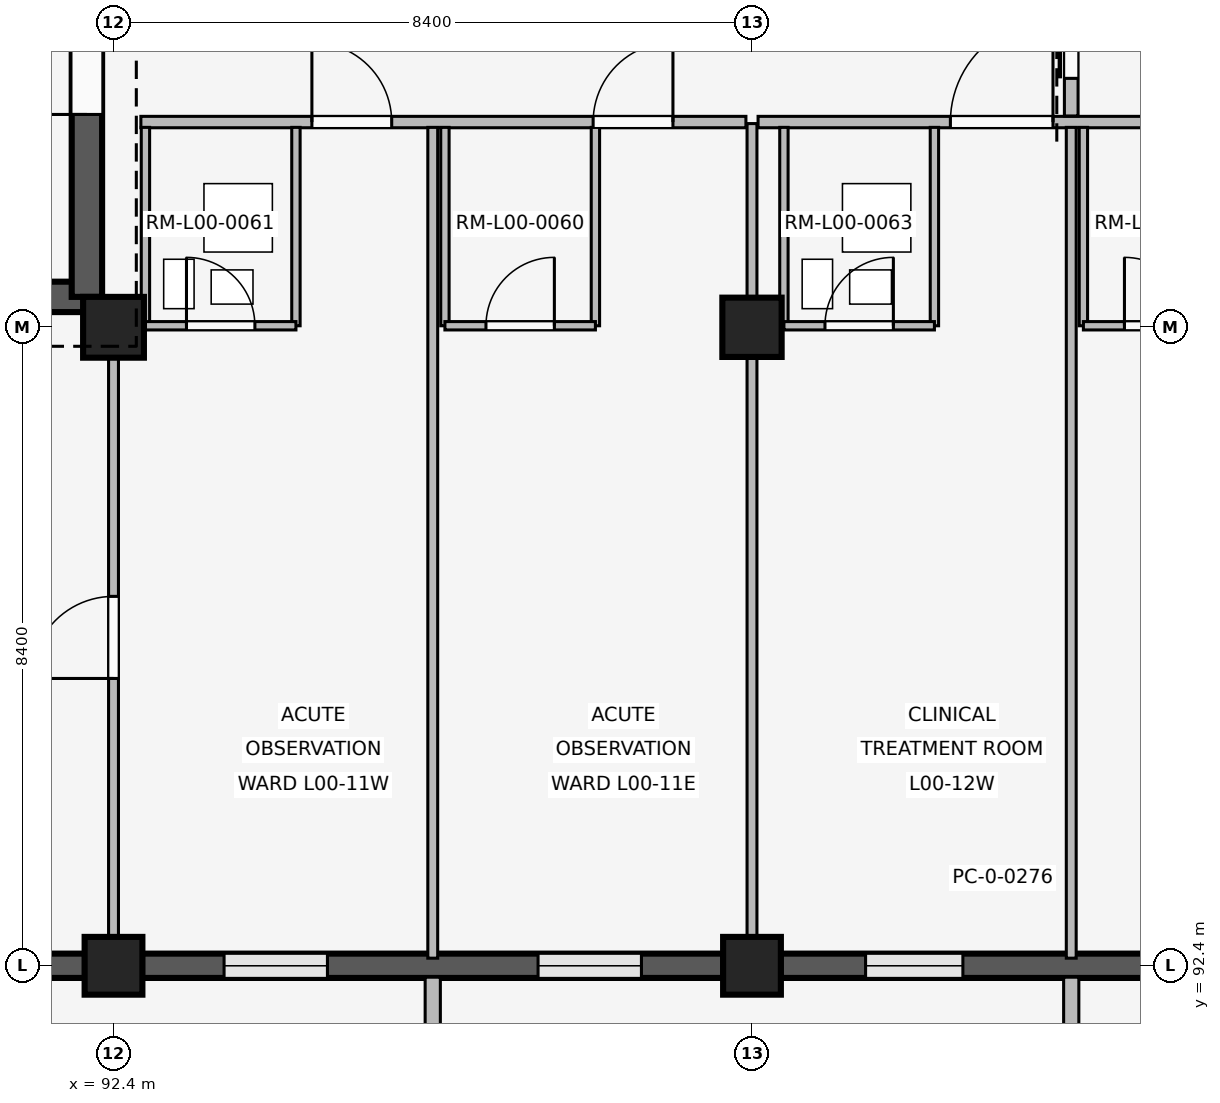
"""IFC4 building model, lengths in metres.
Left out: names, types, materials, properties, quantities, classifications, styles, units other than length and angle.
Written with IfcOpenShell. Run it as: python <this file> out.ifc"""

import sys

from ifc_helpers import new_model, si_unit, direction, frame, frame_2d, origin, origin_2d, place, context, subcontext, project, spatial, rectangle, extrude, element, fill, save


model = new_model("IFC4")
c1 = context("Model", 3, precision=1e-05, world=origin(), true_north=direction((0.0, 1.0)))
c2 = subcontext(c1, "Body", "Model", "MODEL_VIEW")
j1 = project(units=[si_unit("LENGTHUNIT", "METRE"), si_unit("PLANEANGLEUNIT", "RADIAN")], contexts=[c1])
p1 = place(None, origin())
s1 = spatial("IfcSite", under=j1, at=p1, CompositionType="ELEMENT")
p2 = place(p1, origin())
s2 = spatial("IfcBuilding", under=s1, at=p2, CompositionType="ELEMENT")
p3 = place(p2, origin())
s3 = spatial("IfcBuildingStorey", under=s2, at=p3, CompositionType="ELEMENT", Elevation=0.0)
p4 = place(p3, frame((92.4, 92.4, 0.0), z_axis=(0.0, 0.0, 1.0), x_axis=(1.0, 0.0, 0.0)))
e1 = element("IfcColumn", 1, at=p4, inside=s3, PredefinedType="COLUMN", context=c2, shape_type="SweptSolid", body=[
    extrude(rectangle(XDim=0.76, YDim=0.76, at=origin_2d()), origin(), (0.0, 0.0, 1.0), 4.8),
])
p5 = place(p3, frame((92.4, 100.8, 0.0), z_axis=(0.0, 0.0, 1.0), x_axis=(1.0, 0.0, 0.0)))
e2 = element("IfcColumn", 2, at=p5, inside=s3, PredefinedType="COLUMN", context=c2, shape_type="SweptSolid", body=[
    extrude(rectangle(XDim=0.8, YDim=0.8, at=origin_2d()), origin(), (0.0, 0.0, 1.0), 4.8),
])
p6 = place(p3, frame((100.8, 92.4, 0.0), z_axis=(0.0, 0.0, 1.0), x_axis=(1.0, 0.0, 0.0)))
e3 = element("IfcColumn", 3, at=p6, inside=s3, PredefinedType="COLUMN", context=c2, shape_type="SweptSolid", body=[
    extrude(rectangle(XDim=0.76, YDim=0.76, at=origin_2d()), origin(), (0.0, 0.0, 1.0), 4.8),
])
p7 = place(p3, frame((100.8, 100.8, 0.0), z_axis=(0.0, 0.0, 1.0), x_axis=(1.0, 0.0, 0.0)))
e4 = element("IfcColumn", 4, at=p7, inside=s3, PredefinedType="COLUMN", context=c2, shape_type="SweptSolid", body=[
    extrude(rectangle(XDim=0.78, YDim=0.78, at=origin_2d()), origin(), (0.0, 0.0, 1.0), 4.8),
])
p8 = place(p3, frame((92.025, 92.4, 0.0), z_axis=(0.0, 0.0, 1.0), x_axis=(-1.0, 0.0, 0.0)))
e5 = element("IfcWall", 5, at=p8, inside=s3, PredefinedType="SOLIDWALL", context=c2, shape_type="SweptSolid", body=[
    extrude(rectangle(XDim=7.65, YDim=0.32, at=frame_2d((3.825, 0.0))), origin(), (0.0, 0.0, 1.0), 3.82),
])
p9 = place(p8, frame((1.01, 0.0, 0.85)))
e6 = element("IfcOpeningElement", 6, at=p9, cuts=e5, PredefinedType="OPENING", context=c2, shape_type="SweptSolid", body=[
    extrude(rectangle(XDim=1.5, YDim=1.55, at=frame_2d((0.75, 0.775))), frame((0.0, 0.17, 0.0), z_axis=(0.0, -1.0, 0.0), x_axis=(1.0, 0.0, 0.0)), (0.0, 0.0, 1.0), 0.34),
])
p10 = place(p8, frame((5.14, 0.0, 0.85)))
e7 = element("IfcOpeningElement", 7, at=p10, cuts=e5, PredefinedType="OPENING", context=c2, shape_type="SweptSolid", body=[
    extrude(rectangle(XDim=1.5, YDim=1.55, at=frame_2d((0.75, 0.775))), frame((0.0, 0.17, 0.0), z_axis=(0.0, -1.0, 0.0), x_axis=(1.0, 0.0, 0.0)), (0.0, 0.0, 1.0), 0.34),
])
p11 = place(p3, frame((100.425, 92.4, 0.0), z_axis=(0.0, 0.0, 1.0), x_axis=(-1.0, 0.0, 0.0)))
e8 = element("IfcWall", 8, at=p11, inside=s3, PredefinedType="SOLIDWALL", context=c2, shape_type="SweptSolid", body=[
    extrude(rectangle(XDim=7.65, YDim=0.32, at=frame_2d((3.825, 0.0))), origin(), (0.0, 0.0, 1.0), 3.82),
])
p12 = place(p11, frame((1.08, 0.0, 0.85)))
e9 = element("IfcOpeningElement", 9, at=p12, cuts=e8, PredefinedType="OPENING", context=c2, shape_type="SweptSolid", body=[
    extrude(rectangle(XDim=1.36, YDim=1.42, at=frame_2d((0.68, 0.71))), frame((0.0, 0.17, 0.0), z_axis=(0.0, -1.0, 0.0), x_axis=(1.0, 0.0, 0.0)), (0.0, 0.0, 1.0), 0.34),
])
p13 = place(p11, frame((5.21, 0.0, 0.85)))
e10 = element("IfcOpeningElement", 10, at=p13, cuts=e8, PredefinedType="OPENING", context=c2, shape_type="SweptSolid", body=[
    extrude(rectangle(XDim=1.36, YDim=1.42, at=frame_2d((0.68, 0.71))), frame((0.0, 0.17, 0.0), z_axis=(0.0, -1.0, 0.0), x_axis=(1.0, 0.0, 0.0)), (0.0, 0.0, 1.0), 0.34),
])
p14 = place(p3, frame((96.6, 92.25, 0.0), z_axis=(0.0, 0.0, 1.0), x_axis=(0.0, -1.0, 0.0)))
e11 = element("IfcWall", 11, at=p14, inside=s3, PredefinedType="ELEMENTEDWALL", context=c2, shape_type="SweptSolid", body=[
    extrude(rectangle(XDim=0.85, YDim=0.2, at=frame_2d((0.425, 0.0))), origin(), (0.0, 0.0, 1.0), 3.8),
])
p15 = place(p3, frame((108.825, 92.4, 0.0), z_axis=(0.0, 0.0, 1.0), x_axis=(-1.0, 0.0, 0.0)))
e12 = element("IfcWall", 12, at=p15, inside=s3, PredefinedType="SOLIDWALL", context=c2, shape_type="SweptSolid", body=[
    extrude(rectangle(XDim=7.65, YDim=0.32, at=frame_2d((3.825, 0.0))), origin(), (0.0, 0.0, 1.0), 3.82),
])
p16 = place(p15, frame((1.119, 0.0, 0.85)))
e13 = element("IfcOpeningElement", 13, at=p16, cuts=e12, PredefinedType="OPENING", context=c2, shape_type="SweptSolid", body=[
    extrude(rectangle(XDim=1.28, YDim=1.38, at=frame_2d((0.64, 0.69))), frame((0.0, 0.17, 0.0), z_axis=(0.0, -1.0, 0.0), x_axis=(1.0, 0.0, 0.0)), (0.0, 0.0, 1.0), 0.34),
])
p17 = place(p15, frame((5.25, 0.0, 0.85)))
e14 = element("IfcOpeningElement", 14, at=p17, cuts=e12, PredefinedType="OPENING", context=c2, shape_type="SweptSolid", body=[
    extrude(rectangle(XDim=1.28, YDim=1.38, at=frame_2d((0.64, 0.69))), frame((0.0, 0.17, 0.0), z_axis=(0.0, -1.0, 0.0), x_axis=(1.0, 0.0, 0.0)), (0.0, 0.0, 1.0), 0.34),
])
p18 = place(p3, frame((105.0, 92.25, 0.0), z_axis=(0.0, 0.0, 1.0), x_axis=(0.0, -1.0, 0.0)))
e15 = element("IfcWall", 15, at=p18, inside=s3, PredefinedType="ELEMENTEDWALL", context=c2, shape_type="SweptSolid", body=[
    extrude(rectangle(XDim=0.85, YDim=0.2, at=frame_2d((0.425, 0.0))), origin(), (0.0, 0.0, 1.0), 3.8),
])
p19 = place(p3, frame((84.55, 101.2, 0.0), z_axis=(0.0, 0.0, 1.0), x_axis=(1.0, 0.0, 0.0)))
e16 = element("IfcWall", 16, at=p19, inside=s3, PredefinedType="SHEAR", context=c2, shape_type="SweptSolid", body=[
    extrude(rectangle(XDim=7.5, YDim=0.4, at=frame_2d((3.75, 0.0))), origin(), (0.0, 0.0, 1.0), 4.52),
])
p20 = place(p19, frame((4.85, 0.0, 0.0)))
e17 = element("IfcOpeningElement", 17, at=p20, cuts=e16, PredefinedType="OPENING", context=c2, shape_type="SweptSolid", body=[
    extrude(rectangle(XDim=1.2, YDim=2.2, at=frame_2d((0.6, 1.1))), frame((0.0, 0.21, 0.0), z_axis=(0.0, -1.0, 0.0), x_axis=(1.0, 0.0, 0.0)), (0.0, 0.0, 1.0), 0.42),
])
p21 = place(p3, frame((92.05, 101.2, 0.0), z_axis=(0.0, 0.0, 1.0), x_axis=(0.0, 1.0, 0.0)))
e18 = element("IfcWall", 18, at=p21, inside=s3, PredefinedType="SHEAR", context=c2, shape_type="SweptSolid", body=[
    extrude(rectangle(XDim=7.55, YDim=0.4, at=frame_2d((3.775, 0.0))), origin(), (0.0, 0.0, 1.0), 4.52),
])
p22 = place(p21, frame((2.4, 0.0, 0.0)))
e19 = element("IfcOpeningElement", 19, at=p22, cuts=e18, PredefinedType="OPENING", context=c2, shape_type="SweptSolid", body=[
    extrude(rectangle(XDim=1.2, YDim=2.2, at=frame_2d((0.6, 1.1))), frame((0.0, 0.21, 0.0), z_axis=(0.0, -1.0, 0.0), x_axis=(1.0, 0.0, 0.0)), (0.0, 0.0, 1.0), 0.42),
])
p23 = place(p3, frame((92.4, 92.54, 0.0), z_axis=(0.0, 0.0, 1.0), x_axis=(0.0, 1.0, 0.0)))
e20 = element("IfcWall", 20, at=p23, inside=s3, PredefinedType="PARTITIONING", context=c2, shape_type="SweptSolid", body=[
    extrude(rectangle(XDim=8.21, YDim=0.13, at=frame_2d((4.105, 0.0))), origin(), (0.0, 0.0, 1.0), 3.8),
])
p24 = place(p23, frame((3.64, 0.0, 0.0)))
e21 = element("IfcOpeningElement", 21, at=p24, cuts=e20, PredefinedType="OPENING", context=c2, shape_type="SweptSolid", body=[
    extrude(rectangle(XDim=1.08, YDim=2.15, at=frame_2d((0.54, 1.075))), frame((0.0, 0.075, 0.0), z_axis=(0.0, -1.0, 0.0), x_axis=(1.0, 0.0, 0.0)), (0.0, 0.0, 1.0), 0.15),
])
p25 = place(p3, frame((92.76, 103.5, 0.0), z_axis=(0.0, 0.0, 1.0), x_axis=(1.0, 0.0, 0.0)))
e22 = element("IfcWall", 22, at=p25, inside=s3, PredefinedType="PARTITIONING", context=c2, shape_type="SweptSolid", body=[
    extrude(rectangle(XDim=7.96, YDim=0.15, at=frame_2d((3.98, 0.0))), origin(), (0.0, 0.0, 1.0), 3.8),
])
p26 = place(p25, frame((2.25, 0.0, 0.0)))
e23 = element("IfcOpeningElement", 23, at=p26, cuts=e22, PredefinedType="OPENING", context=c2, shape_type="SweptSolid", body=[
    extrude(rectangle(XDim=1.05, YDim=2.2, at=frame_2d((0.525, 1.1))), frame((0.0, 0.085, 0.0), z_axis=(0.0, -1.0, 0.0), x_axis=(1.0, 0.0, 0.0)), (0.0, 0.0, 1.0), 0.17),
])
p27 = place(p25, frame((5.95, 0.0, 0.0)))
e24 = element("IfcOpeningElement", 24, at=p27, cuts=e22, PredefinedType="OPENING", context=c2, shape_type="SweptSolid", body=[
    extrude(rectangle(XDim=1.05, YDim=2.2, at=frame_2d((0.525, 1.1))), frame((0.0, 0.085, 0.0), z_axis=(0.0, -1.0, 0.0), x_axis=(1.0, 0.0, 0.0)), (0.0, 0.0, 1.0), 0.17),
])
p28 = place(p3, frame((96.6, 92.5, 0.0), z_axis=(0.0, 0.0, 1.0), x_axis=(0.0, 1.0, 0.0)))
e25 = element("IfcWall", 25, at=p28, inside=s3, PredefinedType="PARTITIONING", context=c2, shape_type="SweptSolid", body=[
    extrude(rectangle(XDim=10.93, YDim=0.13, at=frame_2d((5.465, 0.0))), origin(), (0.0, 0.0, 1.0), 3.8),
])
for number, where, z_axis, x_axis in (
    (26, (92.82, 100.82, 0.0), (0.0, 0.0, 1.0), (0.0, 1.0, 0.0)),
    (27, (94.8, 100.82, 0.0), (0.0, 0.0, 1.0), (0.0, 1.0, 0.0)),
):
    element("IfcWall", number, at=place(p3, frame(where, z_axis=z_axis, x_axis=x_axis)), inside=s3, PredefinedType="PARTITIONING", context=c2, shape_type="SweptSolid", body=[
        extrude(rectangle(XDim=2.61, YDim=0.11, at=frame_2d((1.305, 0.0))), origin(), (0.0, 0.0, 1.0), 3.8),
    ])
p29 = place(p3, frame((92.82, 100.82, 0.0), z_axis=(0.0, 0.0, 1.0), x_axis=(1.0, 0.0, 0.0)))
e28 = element("IfcWall", 28, at=p29, inside=s3, PredefinedType="PARTITIONING", context=c2, shape_type="SweptSolid", body=[
    extrude(rectangle(XDim=1.98, YDim=0.11, at=frame_2d((0.99, 0.0))), origin(), (0.0, 0.0, 1.0), 3.8),
])
p30 = place(p29, frame((0.54, 0.0, 0.0)))
e29 = element("IfcOpeningElement", 29, at=p30, cuts=e28, PredefinedType="OPENING", context=c2, shape_type="SweptSolid", body=[
    extrude(rectangle(XDim=0.9, YDim=2.1, at=frame_2d((0.45, 1.05))), frame((0.0, 0.065, 0.0), z_axis=(0.0, -1.0, 0.0), x_axis=(1.0, 0.0, 0.0)), (0.0, 0.0, 1.0), 0.13),
])
for number, where, z_axis, x_axis in (
    (30, (96.76, 100.82, 0.0), (0.0, 0.0, 1.0), (0.0, 1.0, 0.0)),
    (31, (98.74, 100.82, 0.0), (0.0, 0.0, 1.0), (0.0, 1.0, 0.0)),
):
    element("IfcWall", number, at=place(p3, frame(where, z_axis=z_axis, x_axis=x_axis)), inside=s3, PredefinedType="PARTITIONING", context=c2, shape_type="SweptSolid", body=[
        extrude(rectangle(XDim=2.61, YDim=0.11, at=frame_2d((1.305, 0.0))), origin(), (0.0, 0.0, 1.0), 3.8),
    ])
p31 = place(p3, frame((96.76, 100.82, 0.0), z_axis=(0.0, 0.0, 1.0), x_axis=(1.0, 0.0, 0.0)))
e32 = element("IfcWall", 32, at=p31, inside=s3, PredefinedType="PARTITIONING", context=c2, shape_type="SweptSolid", body=[
    extrude(rectangle(XDim=1.98, YDim=0.11, at=frame_2d((0.99, 0.0))), origin(), (0.0, 0.0, 1.0), 3.8),
])
p32 = place(p31, frame((0.54, 0.0, 0.0)))
e33 = element("IfcOpeningElement", 33, at=p32, cuts=e32, PredefinedType="OPENING", context=c2, shape_type="SweptSolid", body=[
    extrude(rectangle(XDim=0.9, YDim=2.1, at=frame_2d((0.45, 1.05))), frame((0.0, 0.065, 0.0), z_axis=(0.0, -1.0, 0.0), x_axis=(1.0, 0.0, 0.0)), (0.0, 0.0, 1.0), 0.13),
])
p33 = place(p3, frame((100.8, 92.54, 0.0), z_axis=(0.0, 0.0, 1.0), x_axis=(0.0, 1.0, 0.0)))
e34 = element("IfcWall", 34, at=p33, inside=s3, PredefinedType="PARTITIONING", context=c2, shape_type="SweptSolid", body=[
    extrude(rectangle(XDim=10.94, YDim=0.13, at=frame_2d((5.47, 0.0))), origin(), (0.0, 0.0, 1.0), 3.8),
])
p34 = place(p3, frame((100.88, 103.5, 0.0), z_axis=(0.0, 0.0, 1.0), x_axis=(1.0, 0.0, 0.0)))
e35 = element("IfcWall", 35, at=p34, inside=s3, PredefinedType="PARTITIONING", context=c2, shape_type="SweptSolid", body=[
    extrude(rectangle(XDim=8.24, YDim=0.15, at=frame_2d((4.12, 0.0))), origin(), (0.0, 0.0, 1.0), 3.8),
])
p35 = place(p34, frame((2.53, 0.0, 0.0)))
e36 = element("IfcOpeningElement", 36, at=p35, cuts=e35, PredefinedType="OPENING", context=c2, shape_type="SweptSolid", body=[
    extrude(rectangle(XDim=1.35, YDim=2.25, at=frame_2d((0.675, 1.125))), frame((0.0, 0.085, 0.0), z_axis=(0.0, -1.0, 0.0), x_axis=(1.0, 0.0, 0.0)), (0.0, 0.0, 1.0), 0.17),
])
p36 = place(p34, frame((6.23, 0.0, 0.0)))
e37 = element("IfcOpeningElement", 37, at=p36, cuts=e35, PredefinedType="OPENING", context=c2, shape_type="SweptSolid", body=[
    extrude(rectangle(XDim=1.35, YDim=2.25, at=frame_2d((0.675, 1.125))), frame((0.0, 0.085, 0.0), z_axis=(0.0, -1.0, 0.0), x_axis=(1.0, 0.0, 0.0)), (0.0, 0.0, 1.0), 0.17),
])
p37 = place(p3, frame((105.0, 92.5, 0.0), z_axis=(0.0, 0.0, 1.0), x_axis=(0.0, 1.0, 0.0)))
e38 = element("IfcWall", 38, at=p37, inside=s3, PredefinedType="PARTITIONING", context=c2, shape_type="SweptSolid", body=[
    extrude(rectangle(XDim=10.93, YDim=0.13, at=frame_2d((5.465, 0.0))), origin(), (0.0, 0.0, 1.0), 3.8),
])
for number, where, z_axis, x_axis in (
    (39, (101.22, 100.82, 0.0), (0.0, 0.0, 1.0), (0.0, 1.0, 0.0)),
    (40, (103.2, 100.82, 0.0), (0.0, 0.0, 1.0), (0.0, 1.0, 0.0)),
):
    element("IfcWall", number, at=place(p3, frame(where, z_axis=z_axis, x_axis=x_axis)), inside=s3, PredefinedType="PARTITIONING", context=c2, shape_type="SweptSolid", body=[
        extrude(rectangle(XDim=2.61, YDim=0.11, at=frame_2d((1.305, 0.0))), origin(), (0.0, 0.0, 1.0), 3.8),
    ])
p38 = place(p3, frame((101.22, 100.82, 0.0), z_axis=(0.0, 0.0, 1.0), x_axis=(1.0, 0.0, 0.0)))
e41 = element("IfcWall", 41, at=p38, inside=s3, PredefinedType="PARTITIONING", context=c2, shape_type="SweptSolid", body=[
    extrude(rectangle(XDim=1.98, YDim=0.11, at=frame_2d((0.99, 0.0))), origin(), (0.0, 0.0, 1.0), 3.8),
])
p39 = place(p38, frame((0.54, 0.0, 0.0)))
e42 = element("IfcOpeningElement", 42, at=p39, cuts=e41, PredefinedType="OPENING", context=c2, shape_type="SweptSolid", body=[
    extrude(rectangle(XDim=0.9, YDim=2.1, at=frame_2d((0.45, 1.05))), frame((0.0, 0.065, 0.0), z_axis=(0.0, -1.0, 0.0), x_axis=(1.0, 0.0, 0.0)), (0.0, 0.0, 1.0), 0.13),
])
p40 = place(p3, frame((105.16, 100.82, 0.0), z_axis=(0.0, 0.0, 1.0), x_axis=(0.0, 1.0, 0.0)))
e43 = element("IfcWall", 43, at=p40, inside=s3, PredefinedType="PARTITIONING", context=c2, shape_type="SweptSolid", body=[
    extrude(rectangle(XDim=2.61, YDim=0.11, at=frame_2d((1.305, 0.0))), origin(), (0.0, 0.0, 1.0), 3.8),
])
p41 = place(p3, frame((105.16, 100.82, 0.0), z_axis=(0.0, 0.0, 1.0), x_axis=(1.0, 0.0, 0.0)))
e44 = element("IfcWall", 44, at=p41, inside=s3, PredefinedType="PARTITIONING", context=c2, shape_type="SweptSolid", body=[
    extrude(rectangle(XDim=1.98, YDim=0.11, at=frame_2d((0.99, 0.0))), origin(), (0.0, 0.0, 1.0), 3.8),
])
p42 = place(p41, frame((0.54, 0.0, 0.0)))
e45 = element("IfcOpeningElement", 45, at=p42, cuts=e44, PredefinedType="OPENING", context=c2, shape_type="SweptSolid", body=[
    extrude(rectangle(XDim=0.9, YDim=2.1, at=frame_2d((0.45, 1.05))), frame((0.0, 0.065, 0.0), z_axis=(0.0, -1.0, 0.0), x_axis=(1.0, 0.0, 0.0)), (0.0, 0.0, 1.0), 0.13),
])
p43 = place(p3, frame((103.65, 93.55, 0.0), z_axis=(0.0, 0.0, 1.0), x_axis=(1.0, 0.0, 0.0)))
e46 = element("IfcWall", 46, at=p43, inside=s3, PredefinedType="PLUMBINGWALL", context=c2, shape_type="SweptSolid", body=[
    extrude(rectangle(XDim=0.9, YDim=0.24, at=frame_2d((0.45, 0.0))), origin(), (0.0, 0.0, 1.0), 3.8),
])
p44 = place(p3, frame((105.0, 103.58, 0.0), z_axis=(0.0, 0.0, 1.0), x_axis=(0.0, 1.0, 0.0)))
e47 = element("IfcWall", 47, at=p44, inside=s3, PredefinedType="PARTITIONING", context=c2, shape_type="SweptSolid", body=[
    extrude(rectangle(XDim=2.84, YDim=0.18, at=frame_2d((1.42, 0.0))), origin(), (0.0, 0.0, 1.0), 3.8),
])
p45 = place(p44, frame((0.495, 0.0, 0.0)))
e48 = element("IfcOpeningElement", 48, at=p45, cuts=e47, PredefinedType="OPENING", context=c2, shape_type="SweptSolid", body=[
    extrude(rectangle(XDim=1.85, YDim=2.3, at=frame_2d((0.925, 1.15))), frame((0.0, 0.1, 0.0), z_axis=(0.0, -1.0, 0.0), x_axis=(1.0, 0.0, 0.0)), (0.0, 0.0, 1.0), 0.2),
])
p46 = place(p12, origin())
e49 = element("IfcWindow", 49, at=p46, inside=s3, PartitioningType="SINGLE_PANEL", PredefinedType="WINDOW", context=c2, shape_type="SweptSolid", body=[
    extrude(rectangle(XDim=1.36, YDim=1.42, at=frame_2d((0.68, 0.71))), frame((0.0, 0.03, 0.0), z_axis=(0.0, -1.0, 0.0), x_axis=(1.0, 0.0, 0.0)), (0.0, 0.0, 1.0), 0.06),
])
fill(e9, e49)
p47 = place(p13, origin())
e50 = element("IfcWindow", 50, at=p47, inside=s3, PartitioningType="SINGLE_PANEL", PredefinedType="WINDOW", context=c2, shape_type="SweptSolid", body=[
    extrude(rectangle(XDim=1.36, YDim=1.42, at=frame_2d((0.68, 0.71))), frame((0.0, 0.03, 0.0), z_axis=(0.0, -1.0, 0.0), x_axis=(1.0, 0.0, 0.0)), (0.0, 0.0, 1.0), 0.06),
])
fill(e10, e50)
p48 = place(p17, origin())
e51 = element("IfcWindow", 51, at=p48, inside=s3, PartitioningType="SINGLE_PANEL", PredefinedType="WINDOW", context=c2, shape_type="SweptSolid", body=[
    extrude(rectangle(XDim=1.28, YDim=1.38, at=frame_2d((0.64, 0.69))), frame((0.0, 0.03, 0.0), z_axis=(0.0, -1.0, 0.0), x_axis=(1.0, 0.0, 0.0)), (0.0, 0.0, 1.0), 0.06),
])
fill(e14, e51)
p49 = place(p22, origin())
e52 = element("IfcDoor", 52, at=p49, inside=s3, OperationType="SINGLE_SWING_LEFT", PredefinedType="DOOR", context=c2, shape_type="SweptSolid", body=[
    extrude(rectangle(XDim=1.2, YDim=2.2, at=frame_2d((0.6, 1.1))), frame((0.0, 0.025, 0.0), z_axis=(0.0, -1.0, 0.0), x_axis=(1.0, 0.0, 0.0)), (0.0, 0.0, 1.0), 0.05),
])
fill(e19, e52)
p50 = place(p24, origin())
e53 = element("IfcDoor", 53, at=p50, inside=s3, OperationType="SINGLE_SWING_LEFT", PredefinedType="DOOR", context=c2, shape_type="SweptSolid", body=[
    extrude(rectangle(XDim=1.08, YDim=2.15, at=frame_2d((0.54, 1.075))), frame((0.0, 0.025, 0.0), z_axis=(0.0, -1.0, 0.0), x_axis=(1.0, 0.0, 0.0)), (0.0, 0.0, 1.0), 0.05),
])
fill(e21, e53)
p51 = place(p26, origin())
e54 = element("IfcDoor", 54, at=p51, inside=s3, OperationType="SINGLE_SWING_LEFT", PredefinedType="DOOR", context=c2, shape_type="SweptSolid", body=[
    extrude(rectangle(XDim=1.05, YDim=2.2, at=frame_2d((0.525, 1.1))), frame((0.0, 0.025, 0.0), z_axis=(0.0, -1.0, 0.0), x_axis=(1.0, 0.0, 0.0)), (0.0, 0.0, 1.0), 0.05),
])
fill(e23, e54)
p52 = place(p27, origin())
e55 = element("IfcDoor", 55, at=p52, inside=s3, OperationType="SINGLE_SWING_RIGHT", PredefinedType="DOOR", context=c2, shape_type="SweptSolid", body=[
    extrude(rectangle(XDim=1.05, YDim=2.2, at=frame_2d((0.525, 1.1))), frame((0.0, 0.025, 0.0), z_axis=(0.0, -1.0, 0.0), x_axis=(1.0, 0.0, 0.0)), (0.0, 0.0, 1.0), 0.05),
])
fill(e24, e55)
p53 = place(p30, origin())
e56 = element("IfcDoor", 56, at=p53, inside=s3, OperationType="SINGLE_SWING_LEFT", PredefinedType="DOOR", context=c2, shape_type="SweptSolid", body=[
    extrude(rectangle(XDim=0.9, YDim=2.1, at=frame_2d((0.45, 1.05))), frame((0.0, 0.025, 0.0), z_axis=(0.0, -1.0, 0.0), x_axis=(1.0, 0.0, 0.0)), (0.0, 0.0, 1.0), 0.05),
])
fill(e29, e56)
p54 = place(p32, origin())
e57 = element("IfcDoor", 57, at=p54, inside=s3, OperationType="SINGLE_SWING_RIGHT", PredefinedType="DOOR", context=c2, shape_type="SweptSolid", body=[
    extrude(rectangle(XDim=0.9, YDim=2.1, at=frame_2d((0.45, 1.05))), frame((0.0, 0.025, 0.0), z_axis=(0.0, -1.0, 0.0), x_axis=(1.0, 0.0, 0.0)), (0.0, 0.0, 1.0), 0.05),
])
fill(e33, e57)
p55 = place(p35, origin())
e58 = element("IfcDoor", 58, at=p55, inside=s3, OperationType="SINGLE_SWING_RIGHT", PredefinedType="DOOR", context=c2, shape_type="SweptSolid", body=[
    extrude(rectangle(XDim=1.35, YDim=2.25, at=frame_2d((0.675, 1.125))), frame((0.0, 0.025, 0.0), z_axis=(0.0, -1.0, 0.0), x_axis=(1.0, 0.0, 0.0)), (0.0, 0.0, 1.0), 0.05),
])
fill(e36, e58)
p56 = place(p39, origin())
e59 = element("IfcDoor", 59, at=p56, inside=s3, OperationType="SINGLE_SWING_RIGHT", PredefinedType="DOOR", context=c2, shape_type="SweptSolid", body=[
    extrude(rectangle(XDim=0.9, YDim=2.1, at=frame_2d((0.45, 1.05))), frame((0.0, 0.025, 0.0), z_axis=(0.0, -1.0, 0.0), x_axis=(1.0, 0.0, 0.0)), (0.0, 0.0, 1.0), 0.05),
])
fill(e42, e59)
p57 = place(p42, origin())
e60 = element("IfcDoor", 60, at=p57, inside=s3, OperationType="SINGLE_SWING_LEFT", PredefinedType="DOOR", context=c2, shape_type="SweptSolid", body=[
    extrude(rectangle(XDim=0.9, YDim=2.1, at=frame_2d((0.45, 1.05))), frame((0.0, 0.025, 0.0), z_axis=(0.0, -1.0, 0.0), x_axis=(1.0, 0.0, 0.0)), (0.0, 0.0, 1.0), 0.05),
])
fill(e45, e60)
p58 = place(p45, origin())
e61 = element("IfcDoor", 61, at=p58, inside=s3, OperationType="SLIDING_TO_LEFT", PredefinedType="DOOR", context=c2, shape_type="SweptSolid", body=[
    extrude(rectangle(XDim=1.85, YDim=2.3, at=frame_2d((0.925, 1.15))), frame((0.0, 0.025, 0.0), z_axis=(0.0, -1.0, 0.0), x_axis=(1.0, 0.0, 0.0)), (0.0, 0.0, 1.0), 0.05),
])
fill(e48, e61)
save(model, sys.argv[1])
